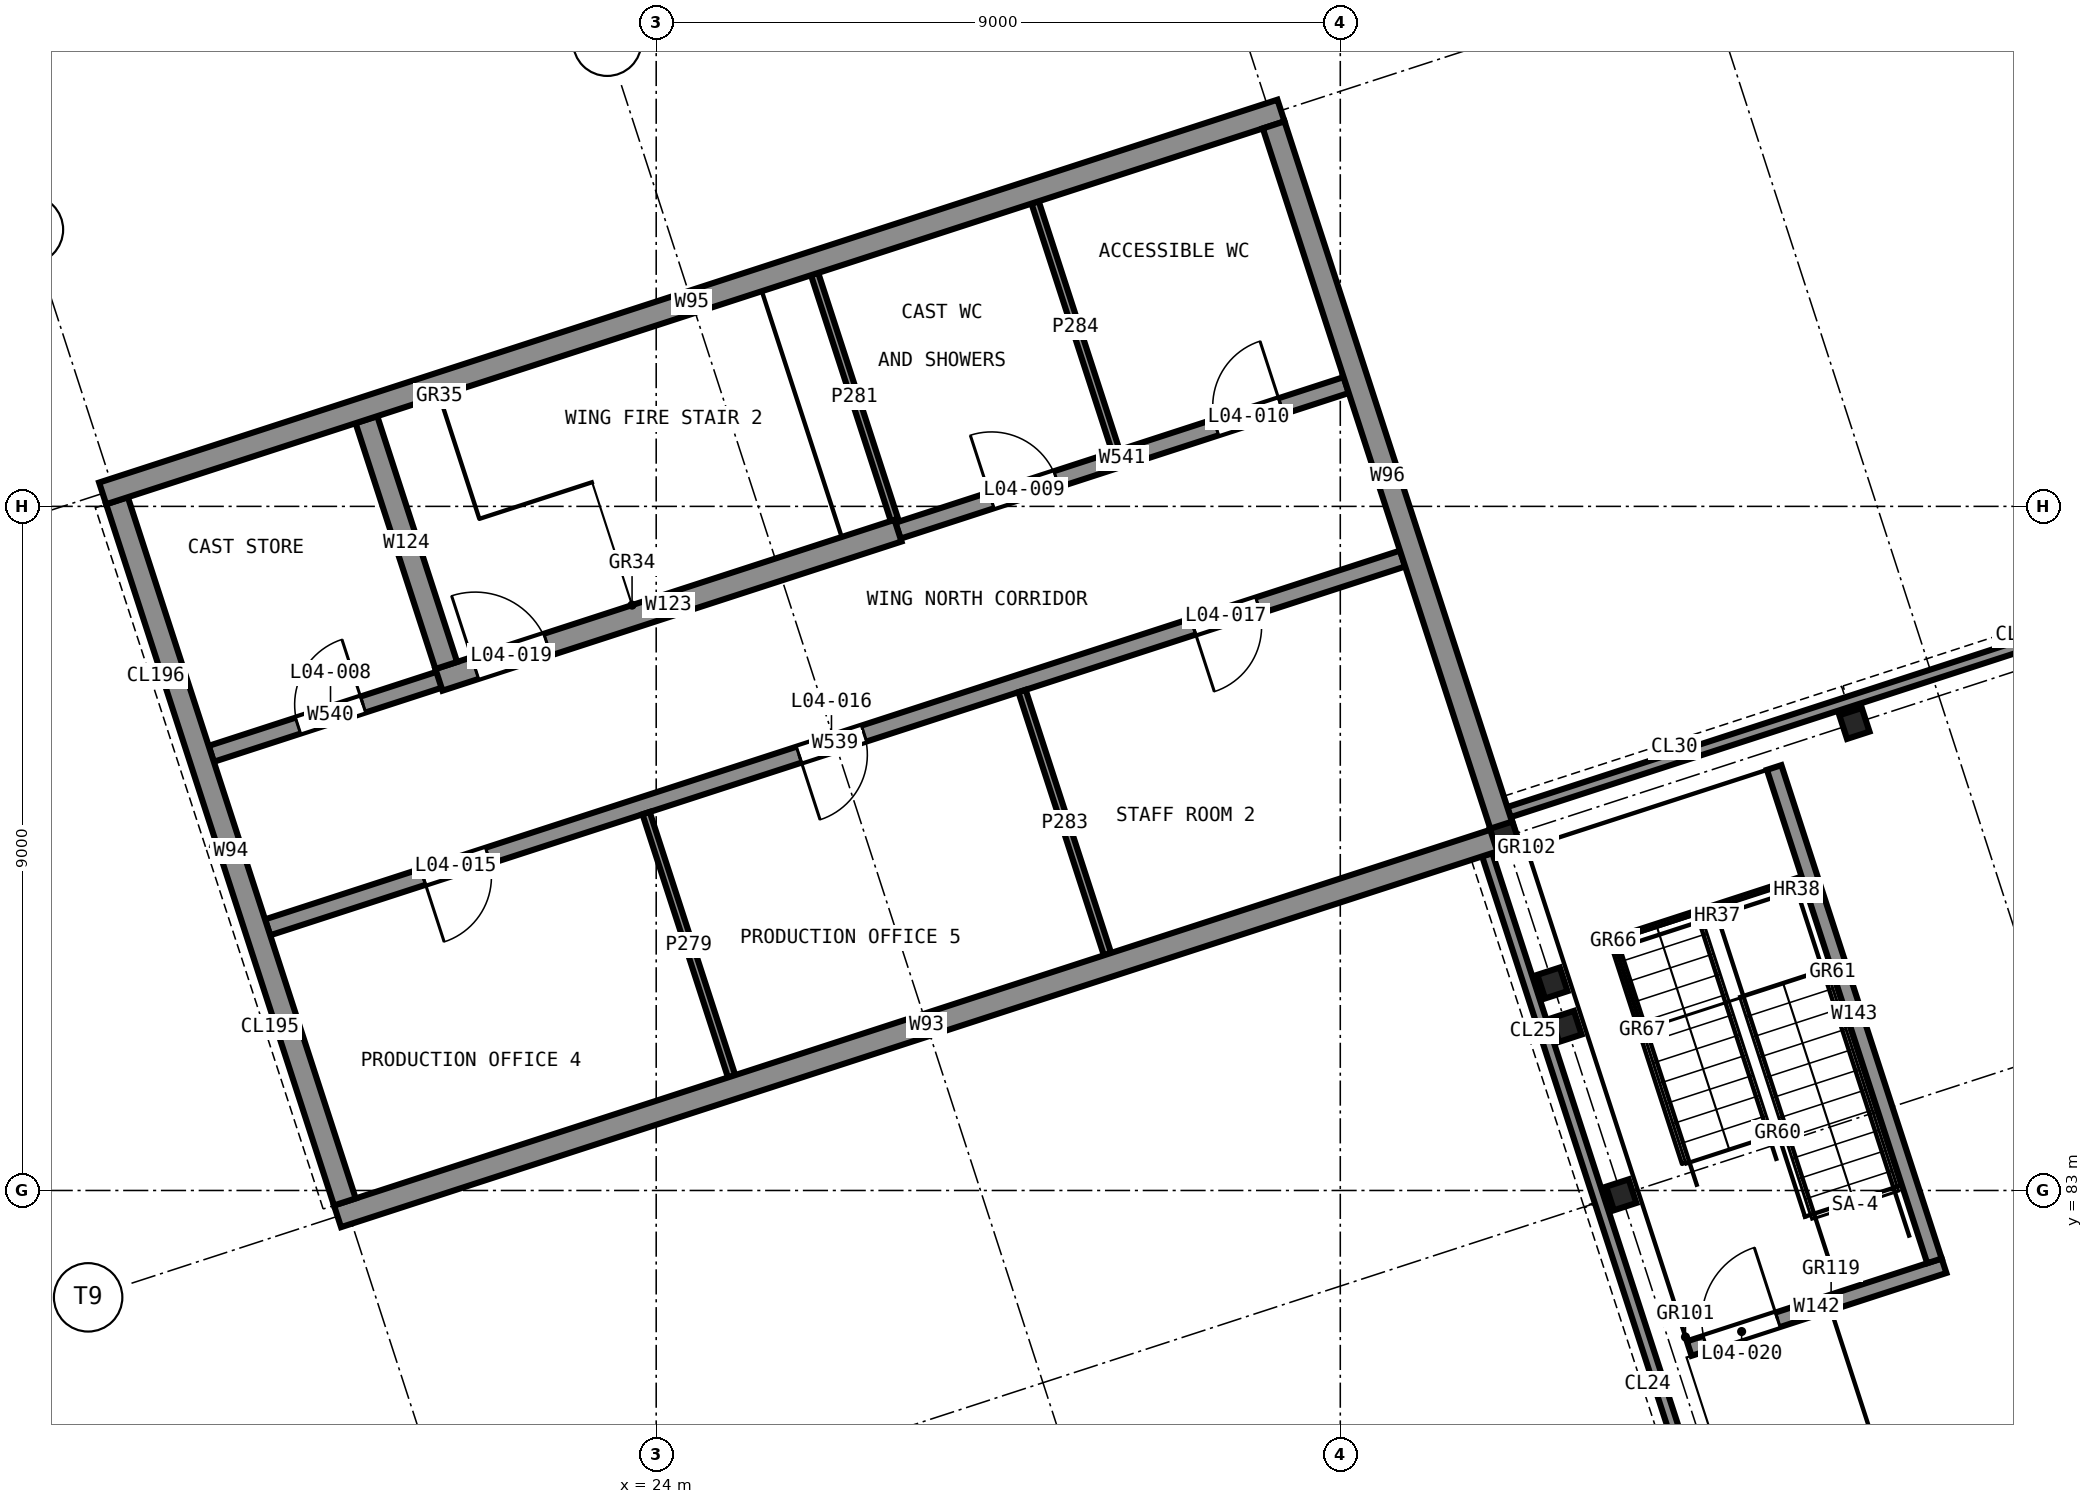
"""IFC4 building model, lengths in metres.
Left out: names, types, materials, properties, quantities, classifications, styles, units other than length and angle.
Written with IfcOpenShell. Run it as: python <this file> out.ifc"""

import sys

from ifc_helpers import new_model, si_unit, direction, frame, frame_2d, origin, origin_2d, place, context, subcontext, project, spatial, rectangle, i_section, extrude, element, fill, save


model = new_model("IFC4")
c1 = context("Model", 3, precision=1e-05, world=origin(), true_north=direction((0.0, 1.0)))
c2 = subcontext(c1, "Body", "Model", "MODEL_VIEW")
j1 = project(units=[si_unit("LENGTHUNIT", "METRE"), si_unit("PLANEANGLEUNIT", "RADIAN")], contexts=[c1])
p1 = place(None, origin())
s1 = spatial("IfcSite", under=j1, at=p1, CompositionType="ELEMENT")
p2 = place(p1, origin())
s2 = spatial("IfcBuilding", under=s1, at=p2, CompositionType="ELEMENT")
p3 = place(p2, frame((0.0, 0.0, 17.5)))
s3 = spatial("IfcBuildingStorey", under=s2, at=p3, CompositionType="ELEMENT", Elevation=17.5)
p4 = place(p3, frame((35.31, 87.697, 0.0), z_axis=(0.0, 0.0, 1.0), x_axis=(-0.951058391285, -0.309011223689, 0.0)))
e1 = element("IfcWall", 1, at=p4, inside=s3, PredefinedType="SOLIDWALL", context=c2, shape_type="SweptSolid", body=[
    extrude(rectangle(XDim=16.3, YDim=0.3, at=frame_2d((8.15, 0.0))), origin(), (0.0, 0.0, 1.0), 4.0),
])
p5 = place(p3, frame((19.904, 82.849, 0.0), z_axis=(0.0, 0.0, 1.0), x_axis=(-0.309000135, 0.951061994073, 0.0)))
e2 = element("IfcWall", 2, at=p5, inside=s3, PredefinedType="SOLIDWALL", context=c2, shape_type="SweptSolid", body=[
    extrude(rectangle(XDim=9.7, YDim=0.3, at=frame_2d((4.85, 0.0))), origin(), (0.0, 0.0, 1.0), 4.0),
])
p6 = place(p3, frame((16.718, 92.171, 0.0), z_axis=(0.0, 0.0, 1.0), x_axis=(0.951058391285, 0.309011223689, 0.0)))
e3 = element("IfcWall", 3, at=p6, inside=s3, PredefinedType="SOLIDWALL", context=c2, shape_type="SweptSolid", body=[
    extrude(rectangle(XDim=16.3, YDim=0.3, at=frame_2d((8.15, 0.0))), origin(), (0.0, 0.0, 1.0), 4.0),
])
p7 = place(p3, frame((32.123, 97.019, 0.0), z_axis=(0.0, 0.0, 1.0), x_axis=(0.309030297822, -0.95105219364, 0.0)))
e4 = element("IfcWall", 4, at=p7, inside=s3, PredefinedType="SOLIDWALL", context=c2, shape_type="SweptSolid", body=[
    extrude(rectangle(XDim=9.7, YDim=0.3, at=frame_2d((4.85, 0.0))), origin(), (0.0, 0.0, 1.0), 4.0),
])
for number, where, z_axis, x_axis in (
    (5, (35.977, 85.159, 0.0), (0.0, 0.0, 1.0), (0.951, 0.309, 0.0)),
    (6, (35.792, 85.729, 0.0), (0.0, 0.0, 1.0), (0.951, 0.309, 0.0)),
):
    element("IfcColumn", number, at=place(p3, frame(where, z_axis=z_axis, x_axis=x_axis)), inside=s3, PredefinedType="COLUMN", context=c2, shape_type="SweptSolid", body=[
        extrude(i_section(OverallWidth=0.311, OverallDepth=0.327, WebThickness=0.016, FlangeThickness=0.025, FilletRadius=0.017, at=origin_2d()), origin(), (0.0, 0.0, 1.0), 4.0),
    ])
p8 = place(p3, frame((27.181, 91.68, 0.0), z_axis=(0.0, 0.0, 1.0), x_axis=(-0.951051301895, -0.309033042189, 0.0)))
e7 = element("IfcWall", 7, at=p8, inside=s3, PredefinedType="SOLIDWALL", context=c2, shape_type="SweptSolid", body=[
    extrude(rectangle(XDim=6.35, YDim=0.3, at=frame_2d((3.175, 0.0))), origin(), (0.0, 0.0, 1.0), 3.7),
])
p9 = place(p8, frame((4.85, 0.0, 0.0)))
e8 = element("IfcOpeningElement", 8, at=p9, cuts=e7, PredefinedType="OPENING", context=c2, shape_type="SweptSolid", body=[
    extrude(rectangle(XDim=1.0, YDim=2.1, at=frame_2d((0.5, 1.05))), frame((0.0, 0.16, 0.0), z_axis=(0.0, -1.0, 0.0), x_axis=(1.0, 0.0, 0.0)), (0.0, 0.0, 1.0), 0.32),
])
p10 = place(p3, frame((21.238, 89.907, 0.0), z_axis=(0.0, 0.0, 1.0), x_axis=(-0.309066587596, 0.951040401051, 0.0)))
e9 = element("IfcWall", 9, at=p10, inside=s3, PredefinedType="SOLIDWALL", context=c2, shape_type="SweptSolid", body=[
    extrude(rectangle(XDim=3.4, YDim=0.3, at=frame_2d((1.7, 0.0))), origin(), (0.0, 0.0, 1.0), 3.7),
])
p11 = place(p3, frame((37.591, 80.92, 0.0), z_axis=(0.0, 0.0, 1.0), x_axis=(0.951052389726, 0.30902969436, 0.0)))
e10 = element("IfcWall", 10, at=p11, inside=s3, PredefinedType="SOLIDWALL", context=c2, shape_type="SweptSolid", body=[
    extrude(rectangle(XDim=3.525, YDim=0.2, at=frame_2d((1.763, 0.0))), origin(), (0.0, 0.0, 1.0), 4.0),
])
p12 = place(p11, frame((0.225, 0.0, 0.0)))
e11 = element("IfcOpeningElement", 11, at=p12, cuts=e10, PredefinedType="OPENING", context=c2, shape_type="SweptSolid", body=[
    extrude(rectangle(XDim=1.0, YDim=2.1, at=frame_2d((0.5, 1.05))), frame((0.0, 0.11, 0.0), z_axis=(0.0, -1.0, 0.0), x_axis=(1.0, 0.0, 0.0)), (0.0, 0.0, 1.0), 0.22),
])
p13 = place(p3, frame((40.817, 82.074, 0.0), z_axis=(0.0, 0.0, 1.0), x_axis=(-0.309028643499, 0.951052731186, 0.0)))
e12 = element("IfcWall", 12, at=p13, inside=s3, PredefinedType="SOLIDWALL", context=c2, shape_type="SweptSolid", body=[
    extrude(rectangle(XDim=6.825, YDim=0.2, at=frame_2d((3.413, 0.0))), origin(), (0.0, 0.0, 1.0), 4.0),
])
for number, where, z_axis, x_axis in (
    (13, (36.697, 82.943, 0.0), (0.0, 0.0, 1.0), (0.951, 0.309, 0.0)),
    (14, (35.167, 87.651, 0.0), (0.0, 0.0, 1.0), (0.951, 0.309, 0.0)),
    (15, (39.764, 89.144, 0.0), (0.0, 0.0, 1.0), (0.951, 0.309, 0.0)),
):
    element("IfcColumn", number, at=place(p3, frame(where, z_axis=z_axis, x_axis=x_axis)), inside=s3, PredefinedType="COLUMN", context=c2, shape_type="SweptSolid", body=[
        extrude(i_section(OverallWidth=0.311, OverallDepth=0.327, WebThickness=0.016, FlangeThickness=0.025, FilletRadius=0.017, at=origin_2d()), origin(), (0.0, 0.0, 1.0), 4.0),
    ])
p14 = place(p3, frame((41.005, 68.729, 0.0), z_axis=(0.0, 0.0, 1.0), x_axis=(-0.309017523599, 0.95105634434, 0.0)))
e16 = element("IfcWall", 16, at=p14, inside=s3, PredefinedType="SOLIDWALL", context=c2, shape_type="SweptSolid", body=[
    extrude(rectangle(XDim=19.65, YDim=0.14, at=frame_2d((9.825, 0.0))), origin(), (0.0, 0.0, 1.0), 4.0),
])
p15 = place(p3, frame((35.219, 87.978, 0.0), z_axis=(0.0, 0.0, 1.0), x_axis=(0.951055192004, 0.309021070093, 0.0)))
e17 = element("IfcWall", 17, at=p15, inside=s3, PredefinedType="SOLIDWALL", context=c2, shape_type="SweptSolid", body=[
    extrude(rectangle(XDim=29.215, YDim=0.14, at=frame_2d((14.607, 0.0))), origin(), (0.0, 0.0, 1.0), 4.0),
])
p16 = place(p3, frame((18.888, 86.462, 0.0), z_axis=(0.0, 0.0, 1.0), x_axis=(0.951056921306, 0.309015747878, 0.0)))
e18 = element("IfcWall", 18, at=p16, inside=s3, PredefinedType="SOLIDWALL", context=c2, shape_type="SweptSolid", body=[
    extrude(rectangle(XDim=15.7, YDim=0.22, at=frame_2d((7.85, 0.0))), origin(), (0.0, 0.0, 1.0), 3.7),
])
p17 = place(p16, frame((2.15, 0.0, 0.0)))
e19 = element("IfcOpeningElement", 19, at=p17, cuts=e18, PredefinedType="OPENING", context=c2, shape_type="SweptSolid", body=[
    extrude(rectangle(XDim=0.9, YDim=2.1, at=frame_2d((0.45, 1.05))), frame((0.0, 0.12, 0.0), z_axis=(0.0, -1.0, 0.0), x_axis=(1.0, 0.0, 0.0)), (0.0, 0.0, 1.0), 0.24),
])
p18 = place(p16, frame((7.35, 0.0, 0.0)))
e20 = element("IfcOpeningElement", 20, at=p18, cuts=e18, PredefinedType="OPENING", context=c2, shape_type="SweptSolid", body=[
    extrude(rectangle(XDim=0.9, YDim=2.1, at=frame_2d((0.45, 1.05))), frame((0.0, 0.12, 0.0), z_axis=(0.0, -1.0, 0.0), x_axis=(1.0, 0.0, 0.0)), (0.0, 0.0, 1.0), 0.24),
])
p19 = place(p16, frame((12.804, 0.0, 0.0)))
e21 = element("IfcOpeningElement", 21, at=p19, cuts=e18, PredefinedType="OPENING", context=c2, shape_type="SweptSolid", body=[
    extrude(rectangle(XDim=0.9, YDim=2.1, at=frame_2d((0.45, 1.05))), frame((0.0, 0.12, 0.0), z_axis=(0.0, -1.0, 0.0), x_axis=(1.0, 0.0, 0.0)), (0.0, 0.0, 1.0), 0.24),
])
p20 = place(p3, frame((18.146, 88.744, 0.0), z_axis=(0.0, 0.0, 1.0), x_axis=(0.951053095941, 0.309027520945, 0.0)))
e22 = element("IfcWall", 22, at=p20, inside=s3, PredefinedType="SOLIDWALL", context=c2, shape_type="SweptSolid", body=[
    extrude(rectangle(XDim=3.3, YDim=0.22, at=frame_2d((1.65, 0.0))), origin(), (0.0, 0.0, 1.0), 3.7),
])
p21 = place(p20, frame((1.2, 0.0, 0.0)))
e23 = element("IfcOpeningElement", 23, at=p21, cuts=e22, PredefinedType="OPENING", context=c2, shape_type="SweptSolid", body=[
    extrude(rectangle(XDim=0.9, YDim=2.1, at=frame_2d((0.45, 1.05))), frame((0.0, 0.12, 0.0), z_axis=(0.0, -1.0, 0.0), x_axis=(1.0, 0.0, 0.0)), (0.0, 0.0, 1.0), 0.24),
])
p22 = place(p3, frame((27.181, 91.68, 0.0), z_axis=(0.0, 0.0, 1.0), x_axis=(0.95106184554, 0.309000592164, 0.0)))
e24 = element("IfcWall", 24, at=p22, inside=s3, PredefinedType="SOLIDWALL", context=c2, shape_type="SweptSolid", body=[
    extrude(rectangle(XDim=6.2, YDim=0.22, at=frame_2d((3.1, 0.0))), origin(), (0.0, 0.0, 1.0), 3.7),
])
p23 = place(p22, frame((1.293, 0.0, 0.0)))
e25 = element("IfcOpeningElement", 25, at=p23, cuts=e24, PredefinedType="OPENING", context=c2, shape_type="SweptSolid", body=[
    extrude(rectangle(XDim=0.9, YDim=2.1, at=frame_2d((0.45, 1.05))), frame((0.0, 0.12, 0.0), z_axis=(0.0, -1.0, 0.0), x_axis=(1.0, 0.0, 0.0)), (0.0, 0.0, 1.0), 0.24),
])
p24 = place(p22, frame((4.4, 0.0, 0.0)))
e26 = element("IfcOpeningElement", 26, at=p24, cuts=e24, PredefinedType="OPENING", context=c2, shape_type="SweptSolid", body=[
    extrude(rectangle(XDim=0.9, YDim=2.1, at=frame_2d((0.45, 1.05))), frame((0.0, 0.12, 0.0), z_axis=(0.0, -1.0, 0.0), x_axis=(1.0, 0.0, 0.0)), (0.0, 0.0, 1.0), 0.24),
])
p25 = place(p3, frame((24.992, 84.502, 0.0), z_axis=(0.0, 0.0, 1.0), x_axis=(-0.309075455797, 0.951037519041, 0.0)))
e27 = element("IfcWall", 27, at=p25, inside=s3, PredefinedType="PARTITIONING", context=c2, shape_type="SweptSolid", body=[
    extrude(rectangle(XDim=3.64, YDim=0.1, at=frame_2d((1.82, 0.0))), origin(), (0.0, 0.0, 1.0), 3.7),
])
p26 = place(p3, frame((27.135, 91.823, 0.0), z_axis=(0.0, 0.0, 1.0), x_axis=(-0.308980533303, 0.951068362443, 0.0)))
e28 = element("IfcWall", 28, at=p26, inside=s3, PredefinedType="PARTITIONING", context=c2, shape_type="SweptSolid", body=[
    extrude(rectangle(XDim=3.4, YDim=0.1, at=frame_2d((1.7, 0.0))), origin(), (0.0, 0.0, 1.0), 3.7),
])
p27 = place(p3, frame((29.938, 86.109, 0.0), z_axis=(0.0, 0.0, 1.0), x_axis=(-0.308995076085, 0.9510636377, 0.0)))
e29 = element("IfcWall", 29, at=p27, inside=s3, PredefinedType="PARTITIONING", context=c2, shape_type="SweptSolid", body=[
    extrude(rectangle(XDim=3.64, YDim=0.1, at=frame_2d((1.82, 0.0))), origin(), (0.0, 0.0, 1.0), 3.7),
])
p28 = place(p3, frame((30.048, 92.727, 0.0), z_axis=(0.0, 0.0, 1.0), x_axis=(-0.309021877853, 0.951054929543, 0.0)))
e30 = element("IfcWall", 30, at=p28, inside=s3, PredefinedType="PARTITIONING", context=c2, shape_type="SweptSolid", body=[
    extrude(rectangle(XDim=3.44, YDim=0.1, at=frame_2d((1.72, 0.0))), origin(), (0.0, 0.0, 1.0), 3.7),
])
p29 = place(p21, origin())
e31 = element("IfcDoor", 31, at=p29, inside=s3, OperationType="SINGLE_SWING_LEFT", PredefinedType="DOOR", context=c2, shape_type="SweptSolid", body=[
    extrude(rectangle(XDim=0.9, YDim=2.1, at=frame_2d((0.45, 1.05))), frame((0.0, 0.025, 0.0), z_axis=(0.0, -1.0, 0.0), x_axis=(1.0, 0.0, 0.0)), (0.0, 0.0, 1.0), 0.05),
])
fill(e23, e31)
p30 = place(p23, origin())
e32 = element("IfcDoor", 32, at=p30, inside=s3, OperationType="SINGLE_SWING_RIGHT", PredefinedType="DOOR", context=c2, shape_type="SweptSolid", body=[
    extrude(rectangle(XDim=0.9, YDim=2.1, at=frame_2d((0.45, 1.05))), frame((0.0, 0.025, 0.0), z_axis=(0.0, -1.0, 0.0), x_axis=(1.0, 0.0, 0.0)), (0.0, 0.0, 1.0), 0.05),
])
fill(e25, e32)
p31 = place(p24, origin())
e33 = element("IfcDoor", 33, at=p31, inside=s3, OperationType="SINGLE_SWING_LEFT", PredefinedType="DOOR", context=c2, shape_type="SweptSolid", body=[
    extrude(rectangle(XDim=0.9, YDim=2.1, at=frame_2d((0.45, 1.05))), frame((0.0, 0.025, 0.0), z_axis=(0.0, -1.0, 0.0), x_axis=(1.0, 0.0, 0.0)), (0.0, 0.0, 1.0), 0.05),
])
fill(e26, e33)
p32 = place(p17, frame((0.9, 0.0, 0.0), z_axis=(0.0, 0.0, 1.0), x_axis=(-1.0, 0.0, 0.0)))
e34 = element("IfcDoor", 34, at=p32, inside=s3, OperationType="SINGLE_SWING_LEFT", PredefinedType="DOOR", context=c2, shape_type="SweptSolid", body=[
    extrude(rectangle(XDim=0.9, YDim=2.1, at=frame_2d((0.45, 1.05))), frame((0.0, 0.025, 0.0), z_axis=(0.0, -1.0, 0.0), x_axis=(1.0, 0.0, 0.0)), (0.0, 0.0, 1.0), 0.05),
])
fill(e19, e34)
p33 = place(p18, frame((0.9, 0.0, 0.0), z_axis=(0.0, 0.0, 1.0), x_axis=(-1.0, 0.0, 0.0)))
e35 = element("IfcDoor", 35, at=p33, inside=s3, OperationType="SINGLE_SWING_LEFT", PredefinedType="DOOR", context=c2, shape_type="SweptSolid", body=[
    extrude(rectangle(XDim=0.9, YDim=2.1, at=frame_2d((0.45, 1.05))), frame((0.0, 0.025, 0.0), z_axis=(0.0, -1.0, 0.0), x_axis=(1.0, 0.0, 0.0)), (0.0, 0.0, 1.0), 0.05),
])
fill(e20, e35)
p34 = place(p19, frame((0.9, 0.0, 0.0), z_axis=(0.0, 0.0, 1.0), x_axis=(-1.0, 0.0, 0.0)))
e36 = element("IfcDoor", 36, at=p34, inside=s3, OperationType="SINGLE_SWING_LEFT", PredefinedType="DOOR", context=c2, shape_type="SweptSolid", body=[
    extrude(rectangle(XDim=0.9, YDim=2.1, at=frame_2d((0.45, 1.05))), frame((0.0, 0.025, 0.0), z_axis=(0.0, -1.0, 0.0), x_axis=(1.0, 0.0, 0.0)), (0.0, 0.0, 1.0), 0.05),
])
fill(e21, e36)
p35 = place(p9, frame((1.0, 0.0, 0.0), z_axis=(0.0, 0.0, 1.0), x_axis=(-1.0, 0.0, 0.0)))
e37 = element("IfcDoor", 37, at=p35, inside=s3, OperationType="SINGLE_SWING_RIGHT", PredefinedType="DOOR", context=c2, shape_type="SweptSolid", body=[
    extrude(rectangle(XDim=1.0, YDim=2.1, at=frame_2d((0.5, 1.05))), frame((0.0, 0.025, 0.0), z_axis=(0.0, -1.0, 0.0), x_axis=(1.0, 0.0, 0.0)), (0.0, 0.0, 1.0), 0.05),
])
fill(e8, e37)
p36 = place(p12, origin())
e38 = element("IfcDoor", 38, at=p36, inside=s3, OperationType="SINGLE_SWING_LEFT", PredefinedType="DOOR", context=c2, shape_type="SweptSolid", body=[
    extrude(rectangle(XDim=1.0, YDim=2.1, at=frame_2d((0.5, 1.05))), frame((0.0, 0.025, 0.0), z_axis=(0.0, -1.0, 0.0), x_axis=(1.0, 0.0, 0.0)), (0.0, 0.0, 1.0), 0.05),
])
fill(e11, e38)
save(model, sys.argv[1])
